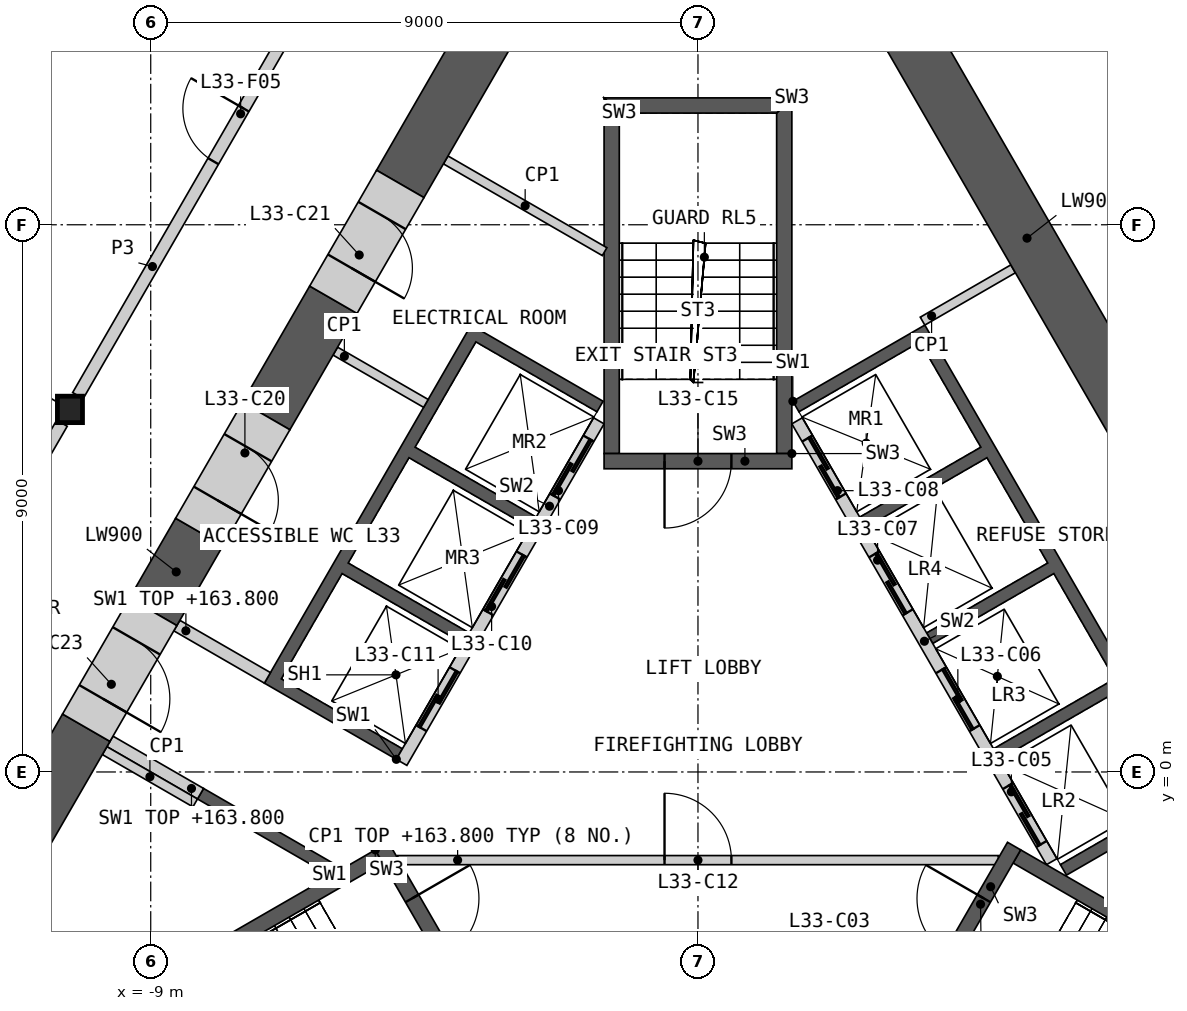
"""IFC4 building model, lengths in metres.
Left out: names, types, materials, properties, quantities, classifications, styles, units other than length and angle.
Written with IfcOpenShell. Run it as: python <this file> out.ifc"""

import sys

from ifc_helpers import new_model, si_unit, direction, frame, frame_2d, origin, origin_2d, place, context, subcontext, project, spatial, polyline, rectangle, i_section, outline, extrude, element, fill, save


model = new_model("IFC4")
c1 = context("Model", 3, precision=1e-05, world=origin(), true_north=direction((0.0, 1.0)))
c2 = subcontext(c1, "Body", "Model", "MODEL_VIEW")
j1 = project(units=[si_unit("LENGTHUNIT", "METRE"), si_unit("PLANEANGLEUNIT", "RADIAN")], contexts=[c1])
p1 = place(None, origin())
s1 = spatial("IfcSite", under=j1, at=p1, CompositionType="ELEMENT")
p2 = place(p1, origin())
s2 = spatial("IfcBuilding", under=s1, at=p2, CompositionType="ELEMENT")
p3 = place(p2, frame((0.0, 0.0, 154.2)))
s3 = spatial("IfcBuildingStorey", under=s2, at=p3, CompositionType="ELEMENT", Elevation=154.2)
p4 = place(p3, frame((-10.328, 5.963, 0.0), z_axis=(0.0, 0.0, 1.0), x_axis=(1.0, 0.0, 0.0)))
e1 = element("IfcColumn", 1, at=p4, inside=s3, PredefinedType="COLUMN", context=c2, shape_type="SweptSolid", body=[
    extrude(i_section(OverallWidth=0.412, OverallDepth=0.435, WebThickness=0.036, FlangeThickness=0.057, at=origin_2d()), origin(), (0.0, 0.0, 1.0), 10.0),
])
p5 = place(p3, origin())
e2 = element("IfcWall", 2, at=p5, inside=s3, PredefinedType="SHEAR", context=c2, shape_type="SweptSolid", body=[
    extrude(outline(polyline([(1.561, 6.097), (3.731, 7.35), (8.231, -0.444), (6.061, -1.697), (5.96, -1.524), (7.952, -0.374), (6.952, 1.358), (4.96, 0.208), (4.861, 0.381), (6.852, 1.531), (5.852, 3.263), (3.861, 2.113), (3.76, 2.287), (5.752, 3.437), (4.752, 5.169), (2.76, 4.019), (2.66, 4.192), (4.652, 5.342), (3.652, 7.074), (1.66, 5.924), (1.561, 6.097)])), origin(), (0.0, 0.0, 1.0), 9.6),
])
p6 = place(p3, frame((5.817, -1.476, 0.0), z_axis=(0.0, 0.0, 1.0), x_axis=(-0.500002616675, 0.866023893041, 0.0)))
e3 = element("IfcWall", 3, at=p6, inside=s3, PredefinedType="SOLIDWALL", context=c2, shape_type="SweptSolid", body=[
    extrude(rectangle(XDim=8.373, YDim=0.2, at=frame_2d((4.187, 0.0))), origin(), (0.0, 0.0, 1.0), 9.6),
])
p7 = place(p6, frame((0.337, 0.0, 0.0)))
e4 = element("IfcOpeningElement", 4, at=p7, cuts=e3, PredefinedType="OPENING", context=c2, shape_type="SweptSolid", body=[
    extrude(rectangle(XDim=1.1, YDim=2.1, at=frame_2d((0.55, 1.05))), frame((0.0, 0.11, 0.0), z_axis=(0.0, -1.0, 0.0), x_axis=(1.0, 0.0, 0.0)), (0.0, 0.0, 1.0), 0.22),
])
p8 = place(p6, frame((2.537, 0.0, 0.0)))
e5 = element("IfcOpeningElement", 5, at=p8, cuts=e3, PredefinedType="OPENING", context=c2, shape_type="SweptSolid", body=[
    extrude(rectangle(XDim=1.1, YDim=2.1, at=frame_2d((0.55, 1.05))), frame((0.0, 0.11, 0.0), z_axis=(0.0, -1.0, 0.0), x_axis=(1.0, 0.0, 0.0)), (0.0, 0.0, 1.0), 0.22),
])
p9 = place(p6, frame((4.737, 0.0, 0.0)))
e6 = element("IfcOpeningElement", 6, at=p9, cuts=e3, PredefinedType="OPENING", context=c2, shape_type="SweptSolid", body=[
    extrude(rectangle(XDim=1.1, YDim=2.1, at=frame_2d((0.55, 1.05))), frame((0.0, 0.11, 0.0), z_axis=(0.0, -1.0, 0.0), x_axis=(1.0, 0.0, 0.0)), (0.0, 0.0, 1.0), 0.22),
])
p10 = place(p6, frame((6.937, 0.0, 0.0)))
e7 = element("IfcOpeningElement", 7, at=p10, cuts=e3, PredefinedType="OPENING", context=c2, shape_type="SweptSolid", body=[
    extrude(rectangle(XDim=1.1, YDim=2.1, at=frame_2d((0.55, 1.05))), frame((0.0, 0.11, 0.0), z_axis=(0.0, -1.0, 0.0), x_axis=(1.0, 0.0, 0.0)), (0.0, 0.0, 1.0), 0.22),
])
p11 = place(p3, origin())
e8 = element("IfcWall", 8, at=p11, inside=s3, PredefinedType="SHEAR", context=c2, shape_type="SweptSolid", body=[
    extrude(outline(polyline([(-6.061, -1.697), (-8.231, -0.444), (-8.131, -0.271), (-5.96, -1.524), (-6.061, -1.697)])), origin(), (0.0, 0.0, 1.0), 9.6),
])
p12 = place(p3, origin())
e9 = element("IfcWall", 9, at=p12, inside=s3, PredefinedType="SHEAR", context=c2, shape_type="SweptSolid", body=[
    extrude(outline(polyline([(-4.96, 0.208), (-7.131, 1.461), (-3.731, 7.35), (-1.561, 6.097), (-1.66, 5.924), (-3.652, 7.074), (-4.652, 5.342), (-2.66, 4.192), (-2.76, 4.019), (-4.752, 5.169), (-5.752, 3.437), (-3.76, 2.287), (-3.861, 2.113), (-5.852, 3.263), (-6.852, 1.531), (-4.861, 0.381), (-4.96, 0.208)])), origin(), (0.0, 0.0, 1.0), 9.6),
])
p13 = place(p3, frame((-1.631, 5.776, 0.0), z_axis=(0.0, 0.0, 1.0), x_axis=(-0.499992876559, -0.866029516466, 0.0)))
e10 = element("IfcWall", 10, at=p13, inside=s3, PredefinedType="SOLIDWALL", context=c2, shape_type="SweptSolid", body=[
    extrude(rectangle(XDim=6.486, YDim=0.2, at=frame_2d((3.243, 0.0))), origin(), (0.0, 0.0, 1.0), 9.6),
])
p14 = place(p13, frame((0.337, 0.0, 0.0)))
e11 = element("IfcOpeningElement", 11, at=p14, cuts=e10, PredefinedType="OPENING", context=c2, shape_type="SweptSolid", body=[
    extrude(rectangle(XDim=1.1, YDim=2.1, at=frame_2d((0.55, 1.05))), frame((0.0, 0.11, 0.0), z_axis=(0.0, -1.0, 0.0), x_axis=(1.0, 0.0, 0.0)), (0.0, 0.0, 1.0), 0.22),
])
p15 = place(p13, frame((2.537, 0.0, 0.0)))
e12 = element("IfcOpeningElement", 12, at=p15, cuts=e10, PredefinedType="OPENING", context=c2, shape_type="SweptSolid", body=[
    extrude(rectangle(XDim=1.1, YDim=2.1, at=frame_2d((0.55, 1.05))), frame((0.0, 0.11, 0.0), z_axis=(0.0, -1.0, 0.0), x_axis=(1.0, 0.0, 0.0)), (0.0, 0.0, 1.0), 0.22),
])
p16 = place(p13, frame((4.737, 0.0, 0.0)))
e13 = element("IfcOpeningElement", 13, at=p16, cuts=e10, PredefinedType="OPENING", context=c2, shape_type="SweptSolid", body=[
    extrude(rectangle(XDim=1.1, YDim=2.1, at=frame_2d((0.55, 1.05))), frame((0.0, 0.11, 0.0), z_axis=(0.0, -1.0, 0.0), x_axis=(1.0, 0.0, 0.0)), (0.0, 0.0, 1.0), 0.22),
])
for number, where, z_axis, x_axis in (
    (14, (-7.081, 1.548, 0.0), (0.0, 0.0, 1.0), (-0.866, 0.5, 0.0)),
    (15, (-8.181, -0.357, 0.0), (0.0, 0.0, 1.0), (-0.866, 0.5, 0.0)),
):
    element("IfcWall", number, at=place(p3, frame(where, z_axis=z_axis, x_axis=x_axis)), inside=s3, PredefinedType="SHEAR", context=c2, shape_type="SweptSolid", body=[
        extrude(rectangle(XDim=1.72, YDim=0.2, at=frame_2d((0.86, 0.0))), origin(), (0.0, 0.0, 1.0), 9.6),
    ])
p17 = place(p3, frame((-4.941, -1.45, 0.0), z_axis=(0.0, 0.0, 1.0), x_axis=(1.0, 0.0, 0.0)))
e16 = element("IfcWall", 16, at=p17, inside=s3, PredefinedType="PARTITIONING", context=c2, shape_type="SweptSolid", body=[
    extrude(rectangle(XDim=9.882, YDim=0.15, at=frame_2d((4.941, 0.0))), origin(), (0.0, 0.0, 1.0), 9.6),
])
p18 = place(p17, frame((4.391, 0.0, 0.0)))
e17 = element("IfcOpeningElement", 17, at=p18, cuts=e16, PredefinedType="OPENING", context=c2, shape_type="SweptSolid", body=[
    extrude(rectangle(XDim=1.1, YDim=2.1, at=frame_2d((0.55, 1.05))), frame((0.0, 0.085, 0.0), z_axis=(0.0, -1.0, 0.0), x_axis=(1.0, 0.0, 0.0)), (0.0, 0.0, 1.0), 0.17),
])
p19 = place(p3, origin())
e18 = element("IfcWall", 18, at=p19, inside=s3, PredefinedType="SHEAR", context=c2, shape_type="SweptSolid", body=[
    extrude(outline(polyline([(-5.307, -1.281), (-10.374, -4.206), (-10.032, -4.298), (-5.182, -1.498), (-5.307, -1.281)])), origin(), (0.0, 0.0, 1.0), 9.6),
])
p20 = place(p3, frame((-5.199, -1.219, 0.0), z_axis=(0.0, 0.0, 1.0), x_axis=(0.499982516597, -0.866035497597, 0.0)))
e19 = element("IfcWall", 19, at=p20, inside=s3, PredefinedType="SHEAR", context=c2, shape_type="SweptSolid", body=[
    extrude(rectangle(XDim=3.088, YDim=0.25, at=frame_2d((1.544, 0.0))), origin(), (0.0, 0.0, 1.0), 9.6),
])
p21 = place(p20, frame((0.994, 0.0, 0.0)))
e20 = element("IfcOpeningElement", 20, at=p21, cuts=e19, PredefinedType="OPENING", context=c2, shape_type="SweptSolid", body=[
    extrude(rectangle(XDim=1.1, YDim=2.1, at=frame_2d((0.55, 1.05))), frame((0.0, 0.135, 0.0), z_axis=(0.0, -1.0, 0.0), x_axis=(1.0, 0.0, 0.0)), (0.0, 0.0, 1.0), 0.27),
])
p22 = place(p3, origin())
e21 = element("IfcWall", 21, at=p22, inside=s3, PredefinedType="SHEAR", context=c2, shape_type="SweptSolid", body=[
    extrude(outline(polyline([(10.032, -4.298), (10.374, -4.206), (5.307, -1.281), (5.182, -1.498), (10.032, -4.298)])), origin(), (0.0, 0.0, 1.0), 9.6),
])
p23 = place(p3, frame((3.655, -3.893, 0.0), z_axis=(0.0, 0.0, 1.0), x_axis=(0.499982516597, 0.866035497597, 0.0)))
e22 = element("IfcWall", 22, at=p23, inside=s3, PredefinedType="SHEAR", context=c2, shape_type="SweptSolid", body=[
    extrude(rectangle(XDim=3.088, YDim=0.25, at=frame_2d((1.544, 0.0))), origin(), (0.0, 0.0, 1.0), 9.6),
])
p24 = place(p23, frame((0.994, 0.0, 0.0)))
e23 = element("IfcOpeningElement", 23, at=p24, cuts=e22, PredefinedType="OPENING", context=c2, shape_type="SweptSolid", body=[
    extrude(rectangle(XDim=1.1, YDim=2.1, at=frame_2d((0.55, 1.05))), frame((0.0, 0.135, 0.0), z_axis=(0.0, -1.0, 0.0), x_axis=(1.0, 0.0, 0.0)), (0.0, 0.0, 1.0), 0.27),
])
p25 = place(p3, origin())
e24 = element("IfcWall", 24, at=p25, inside=s3, PredefinedType="SHEAR", context=c2, shape_type="SweptSolid", body=[
    extrude(outline(polyline([(1.544, 5.237), (1.544, 11.087), (1.294, 10.837), (1.294, 5.237), (1.544, 5.237)])), origin(), (0.0, 0.0, 1.0), 9.6),
])
p26 = place(p3, origin())
e25 = element("IfcWall", 25, at=p26, inside=s3, PredefinedType="SHEAR", context=c2, shape_type="SweptSolid", body=[
    extrude(outline(polyline([(1.544, 11.087), (-1.544, 11.087), (-1.294, 10.837), (1.294, 10.837), (1.544, 11.087)])), origin(), (0.0, 0.0, 1.0), 9.6),
])
p27 = place(p3, origin())
e26 = element("IfcWall", 26, at=p27, inside=s3, PredefinedType="SHEAR", context=c2, shape_type="SweptSolid", body=[
    extrude(outline(polyline([(-1.294, 10.837), (-1.544, 11.087), (-1.544, 5.237), (-1.294, 5.237), (-1.294, 10.837)])), origin(), (0.0, 0.0, 1.0), 9.6),
])
p28 = place(p3, frame((1.544, 5.112, 0.0), z_axis=(0.0, 0.0, 1.0), x_axis=(-1.0, 0.0, 0.0)))
e27 = element("IfcWall", 27, at=p28, inside=s3, PredefinedType="SHEAR", context=c2, shape_type="SweptSolid", body=[
    extrude(rectangle(XDim=3.088, YDim=0.25, at=frame_2d((1.544, 0.0))), origin(), (0.0, 0.0, 1.0), 9.6),
])
p29 = place(p28, frame((0.994, 0.0, 0.0)))
e28 = element("IfcOpeningElement", 28, at=p29, cuts=e27, PredefinedType="OPENING", context=c2, shape_type="SweptSolid", body=[
    extrude(rectangle(XDim=1.1, YDim=2.1, at=frame_2d((0.55, 1.05))), frame((0.0, 0.135, 0.0), z_axis=(0.0, -1.0, 0.0), x_axis=(1.0, 0.0, 0.0)), (0.0, 0.0, 1.0), 0.27),
])
for number, where, z_axis, x_axis in (
    (29, (3.693, 7.415, 0.0), (0.0, 0.0, 1.0), (0.866, 0.5, 0.0)),
    (30, (-8.268, -0.509, 0.0), (0.0, 0.0, 1.0), (-0.866, 0.5, 0.0)),
    (31, (-5.964, 6.922, 0.0), (0.0, 0.0, 1.0), (0.866, -0.5, 0.0)),
):
    element("IfcWall", number, at=place(p3, frame(where, z_axis=z_axis, x_axis=x_axis)), inside=s3, PredefinedType="PARTITIONING", context=c2, shape_type="SweptSolid", body=[
        extrude(rectangle(XDim=1.72, YDim=0.15, at=frame_2d((0.86, 0.0))), origin(), (0.0, 0.0, 1.0), 9.6),
    ])
p30 = place(p3, frame((-4.149, 10.067, 0.0), z_axis=(0.0, 0.0, 1.0), x_axis=(0.865988872794, -0.500063268193, 0.0)))
e32 = element("IfcWall", 32, at=p30, inside=s3, PredefinedType="PARTITIONING", context=c2, shape_type="SweptSolid", body=[
    extrude(rectangle(XDim=3.018, YDim=0.15, at=frame_2d((1.509, 0.0))), origin(), (0.0, 0.0, 1.0), 9.6),
])
p31 = place(p3, frame((7.31, 5.491, 0.0), z_axis=(0.0, 0.0, 1.0), x_axis=(-0.499996970966, 0.866027152591, 0.0)))
e33 = element("IfcWall", 33, at=p31, inside=s3, PredefinedType="SHEAR", context=c2, shape_type="SweptSolid", body=[
    extrude(rectangle(XDim=7.596, YDim=0.9, at=frame_2d((3.798, 0.0))), origin(), (0.0, 0.0, 1.0), 9.6),
])
p32 = place(p3, frame((-0.39, 17.478, 0.0), z_axis=(0.0, 0.0, 1.0), x_axis=(-0.499999130374, -0.866025905863, 0.0)))
e34 = element("IfcWall", 34, at=p32, inside=s3, PredefinedType="SHEAR", context=c2, shape_type="SweptSolid", body=[
    extrude(rectangle(XDim=9.013, YDim=0.9, at=frame_2d((4.507, 0.0))), origin(), (0.0, 0.0, 1.0), 9.6),
])
p33 = place(p3, frame((-10.06, 0.728, 0.0), z_axis=(0.0, 0.0, 1.0), x_axis=(-0.499996331799, -0.866027521611, 0.0)))
e35 = element("IfcWall", 35, at=p33, inside=s3, PredefinedType="SHEAR", context=c2, shape_type="SweptSolid", body=[
    extrude(rectangle(XDim=4.295, YDim=0.9, at=frame_2d((2.148, 0.0))), origin(), (0.0, 0.0, 1.0), 9.6),
])
p34 = place(p3, frame((-5.996, 7.767, 0.0), z_axis=(0.0, 0.0, 1.0), x_axis=(-0.499990325971, -0.866030989016, 0.0)))
e36 = element("IfcWall", 36, at=p34, inside=s3, PredefinedType="SHEAR", context=c2, shape_type="SweptSolid", body=[
    extrude(rectangle(XDim=2.209, YDim=0.9, at=frame_2d((1.104, 0.0))), origin(), (0.0, 0.0, 1.0), 9.6),
])
p35 = place(p3, frame((-8.201, 3.948, 0.0), z_axis=(0.0, 0.0, 1.0), x_axis=(-0.499977585228, -0.866038344573, 0.0)))
e37 = element("IfcWall", 37, at=p35, inside=s3, PredefinedType="SHEAR", context=c2, shape_type="SweptSolid", body=[
    extrude(rectangle(XDim=1.519, YDim=0.9, at=frame_2d((0.759, 0.0))), origin(), (0.0, 0.0, 1.0), 9.6),
])
p36 = place(p3, frame((-7.101, 5.854, 0.0), z_axis=(0.0, 0.0, 1.0), x_axis=(-0.499898558967, -0.866083962871, 0.0)))
e38 = element("IfcWall", 38, at=p36, inside=s3, PredefinedType="SHEAR", context=c2, shape_type="SweptSolid", body=[
    extrude(rectangle(XDim=2.2, YDim=0.9, at=frame_2d((1.1, 0.0))), origin(), (0.0, 0.0, 1.0), 9.6),
])
p37 = place(p36, frame((0.6, 0.0, 0.0)))
e39 = element("IfcOpeningElement", 39, at=p37, cuts=e38, PredefinedType="OPENING", context=c2, shape_type="SweptSolid", body=[
    extrude(rectangle(XDim=1.0, YDim=2.1, at=frame_2d((0.5, 1.05))), frame((0.0, 0.46, 0.0), z_axis=(0.0, -1.0, 0.0), x_axis=(1.0, 0.0, 0.0)), (0.0, 0.0, 1.0), 0.92),
])
p38 = place(p3, frame((-4.896, 9.672, 0.0), z_axis=(0.0, 0.0, 1.0), x_axis=(-0.50002983664, -0.866008176907, 0.0)))
e40 = element("IfcWall", 40, at=p38, inside=s3, PredefinedType="SHEAR", context=c2, shape_type="SweptSolid", body=[
    extrude(rectangle(XDim=2.2, YDim=0.9, at=frame_2d((1.1, 0.0))), origin(), (0.0, 0.0, 1.0), 9.6),
])
p39 = place(p38, frame((0.6, 0.0, 0.0)))
e41 = element("IfcOpeningElement", 41, at=p39, cuts=e40, PredefinedType="OPENING", context=c2, shape_type="SweptSolid", body=[
    extrude(rectangle(XDim=1.0, YDim=2.1, at=frame_2d((0.5, 1.05))), frame((0.0, 0.46, 0.0), z_axis=(0.0, -1.0, 0.0), x_axis=(1.0, 0.0, 0.0)), (0.0, 0.0, 1.0), 0.92),
])
p40 = place(p3, frame((-8.96, 2.633, 0.0), z_axis=(0.0, 0.0, 1.0), x_axis=(-0.50002983664, -0.866008176907, 0.0)))
e42 = element("IfcWall", 42, at=p40, inside=s3, PredefinedType="SHEAR", context=c2, shape_type="SweptSolid", body=[
    extrude(rectangle(XDim=2.2, YDim=0.9, at=frame_2d((1.1, 0.0))), origin(), (0.0, 0.0, 1.0), 9.6),
])
p41 = place(p40, frame((0.55, 0.0, 0.0)))
e43 = element("IfcOpeningElement", 43, at=p41, cuts=e42, PredefinedType="OPENING", context=c2, shape_type="SweptSolid", body=[
    extrude(rectangle(XDim=1.1, YDim=2.1, at=frame_2d((0.55, 1.05))), frame((0.0, 0.46, 0.0), z_axis=(0.0, -1.0, 0.0), x_axis=(1.0, 0.0, 0.0)), (0.0, 0.0, 1.0), 0.92),
])
p42 = place(p3, frame((-15.361, -2.754, 0.0), z_axis=(0.0, 0.0, 1.0), x_axis=(0.500004141693, 0.866023012564, 0.0)))
e44 = element("IfcWall", 44, at=p42, inside=s3, PredefinedType="PARTITIONING", context=c2, shape_type="SweptSolid", body=[
    extrude(rectangle(XDim=9.803, YDim=0.2, at=frame_2d((4.902, 0.0))), origin(), (0.0, 0.0, 1.0), 9.6),
])
p43 = place(p3, frame((-10.197, 6.19, 0.0), z_axis=(0.0, 0.0, 1.0), x_axis=(0.500012035596, 0.866018454918, 0.0)))
e45 = element("IfcWall", 45, at=p43, inside=s3, PredefinedType="PARTITIONING", context=c2, shape_type="SweptSolid", body=[
    extrude(rectangle(XDim=9.803, YDim=0.2, at=frame_2d((4.902, 0.0))), origin(), (0.0, 0.0, 1.0), 9.6),
])
p44 = place(p43, frame((4.452, 0.0, 0.0)))
e46 = element("IfcOpeningElement", 46, at=p44, cuts=e45, PredefinedType="OPENING", context=c2, shape_type="SweptSolid", body=[
    extrude(rectangle(XDim=1.0, YDim=2.1, at=frame_2d((0.5, 1.05))), frame((0.0, 0.11, 0.0), z_axis=(0.0, -1.0, 0.0), x_axis=(1.0, 0.0, 0.0)), (0.0, 0.0, 1.0), 0.22),
])
p45 = place(p3, frame((5.295, 14.68, 0.0), z_axis=(0.0, 0.0, 1.0), x_axis=(0.500012035596, -0.866018454918, 0.0)))
e47 = element("IfcWall", 47, at=p45, inside=s3, PredefinedType="PARTITIONING", context=c2, shape_type="SweptSolid", body=[
    extrude(rectangle(XDim=9.803, YDim=0.2, at=frame_2d((4.902, 0.0))), origin(), (0.0, 0.0, 1.0), 9.6),
])
p46 = place(p7, origin())
e48 = element("IfcDoor", 48, at=p46, inside=s3, OperationType="SLIDING_TO_LEFT", PredefinedType="DOOR", context=c2, shape_type="SweptSolid", body=[
    extrude(rectangle(XDim=1.1, YDim=2.1, at=frame_2d((0.55, 1.05))), frame((0.0, 0.025, 0.0), z_axis=(0.0, -1.0, 0.0), x_axis=(1.0, 0.0, 0.0)), (0.0, 0.0, 1.0), 0.05),
])
fill(e4, e48)
p47 = place(p8, origin())
e49 = element("IfcDoor", 49, at=p47, inside=s3, OperationType="SLIDING_TO_LEFT", PredefinedType="DOOR", context=c2, shape_type="SweptSolid", body=[
    extrude(rectangle(XDim=1.1, YDim=2.1, at=frame_2d((0.55, 1.05))), frame((0.0, 0.025, 0.0), z_axis=(0.0, -1.0, 0.0), x_axis=(1.0, 0.0, 0.0)), (0.0, 0.0, 1.0), 0.05),
])
fill(e5, e49)
p48 = place(p9, origin())
e50 = element("IfcDoor", 50, at=p48, inside=s3, OperationType="SLIDING_TO_LEFT", PredefinedType="DOOR", context=c2, shape_type="SweptSolid", body=[
    extrude(rectangle(XDim=1.1, YDim=2.1, at=frame_2d((0.55, 1.05))), frame((0.0, 0.025, 0.0), z_axis=(0.0, -1.0, 0.0), x_axis=(1.0, 0.0, 0.0)), (0.0, 0.0, 1.0), 0.05),
])
fill(e6, e50)
p49 = place(p10, origin())
e51 = element("IfcDoor", 51, at=p49, inside=s3, OperationType="SLIDING_TO_LEFT", PredefinedType="DOOR", context=c2, shape_type="SweptSolid", body=[
    extrude(rectangle(XDim=1.1, YDim=2.1, at=frame_2d((0.55, 1.05))), frame((0.0, 0.025, 0.0), z_axis=(0.0, -1.0, 0.0), x_axis=(1.0, 0.0, 0.0)), (0.0, 0.0, 1.0), 0.05),
])
fill(e7, e51)
p50 = place(p14, origin())
e52 = element("IfcDoor", 52, at=p50, inside=s3, OperationType="SLIDING_TO_LEFT", PredefinedType="DOOR", context=c2, shape_type="SweptSolid", body=[
    extrude(rectangle(XDim=1.1, YDim=2.1, at=frame_2d((0.55, 1.05))), frame((0.0, 0.025, 0.0), z_axis=(0.0, -1.0, 0.0), x_axis=(1.0, 0.0, 0.0)), (0.0, 0.0, 1.0), 0.05),
])
fill(e11, e52)
p51 = place(p15, origin())
e53 = element("IfcDoor", 53, at=p51, inside=s3, OperationType="SLIDING_TO_LEFT", PredefinedType="DOOR", context=c2, shape_type="SweptSolid", body=[
    extrude(rectangle(XDim=1.1, YDim=2.1, at=frame_2d((0.55, 1.05))), frame((0.0, 0.025, 0.0), z_axis=(0.0, -1.0, 0.0), x_axis=(1.0, 0.0, 0.0)), (0.0, 0.0, 1.0), 0.05),
])
fill(e12, e53)
p52 = place(p16, origin())
e54 = element("IfcDoor", 54, at=p52, inside=s3, OperationType="SLIDING_TO_LEFT", PredefinedType="DOOR", context=c2, shape_type="SweptSolid", body=[
    extrude(rectangle(XDim=1.1, YDim=2.1, at=frame_2d((0.55, 1.05))), frame((0.0, 0.025, 0.0), z_axis=(0.0, -1.0, 0.0), x_axis=(1.0, 0.0, 0.0)), (0.0, 0.0, 1.0), 0.05),
])
fill(e13, e54)
p53 = place(p18, origin())
e55 = element("IfcDoor", 55, at=p53, inside=s3, OperationType="SINGLE_SWING_LEFT", PredefinedType="DOOR", context=c2, shape_type="SweptSolid", body=[
    extrude(rectangle(XDim=1.1, YDim=2.1, at=frame_2d((0.55, 1.05))), frame((0.0, 0.025, 0.0), z_axis=(0.0, -1.0, 0.0), x_axis=(1.0, 0.0, 0.0)), (0.0, 0.0, 1.0), 0.05),
])
fill(e17, e55)
p54 = place(p21, origin())
e56 = element("IfcDoor", 56, at=p54, inside=s3, OperationType="SINGLE_SWING_LEFT", PredefinedType="DOOR", context=c2, shape_type="SweptSolid", body=[
    extrude(rectangle(XDim=1.1, YDim=2.1, at=frame_2d((0.55, 1.05))), frame((0.0, 0.025, 0.0), z_axis=(0.0, -1.0, 0.0), x_axis=(1.0, 0.0, 0.0)), (0.0, 0.0, 1.0), 0.05),
])
fill(e20, e56)
p55 = place(p24, origin())
e57 = element("IfcDoor", 57, at=p55, inside=s3, OperationType="SINGLE_SWING_RIGHT", PredefinedType="DOOR", context=c2, shape_type="SweptSolid", body=[
    extrude(rectangle(XDim=1.1, YDim=2.1, at=frame_2d((0.55, 1.05))), frame((0.0, 0.025, 0.0), z_axis=(0.0, -1.0, 0.0), x_axis=(1.0, 0.0, 0.0)), (0.0, 0.0, 1.0), 0.05),
])
fill(e23, e57)
p56 = place(p29, origin())
e58 = element("IfcDoor", 58, at=p56, inside=s3, OperationType="SINGLE_SWING_RIGHT", PredefinedType="DOOR", context=c2, shape_type="SweptSolid", body=[
    extrude(rectangle(XDim=1.1, YDim=2.1, at=frame_2d((0.55, 1.05))), frame((0.0, 0.025, 0.0), z_axis=(0.0, -1.0, 0.0), x_axis=(1.0, 0.0, 0.0)), (0.0, 0.0, 1.0), 0.05),
])
fill(e28, e58)
p57 = place(p37, origin())
e59 = element("IfcDoor", 59, at=p57, inside=s3, OperationType="SINGLE_SWING_RIGHT", PredefinedType="DOOR", context=c2, shape_type="SweptSolid", body=[
    extrude(rectangle(XDim=1.0, YDim=2.1, at=frame_2d((0.5, 1.05))), frame((0.0, 0.205, 0.0), z_axis=(0.0, -1.0, 0.0), x_axis=(1.0, 0.0, 0.0)), (0.0, 0.0, 1.0), 0.05),
])
fill(e39, e59)
p58 = place(p39, origin())
e60 = element("IfcDoor", 60, at=p58, inside=s3, OperationType="SINGLE_SWING_RIGHT", PredefinedType="DOOR", context=c2, shape_type="SweptSolid", body=[
    extrude(rectangle(XDim=1.0, YDim=2.1, at=frame_2d((0.5, 1.05))), frame((0.0, 0.205, 0.0), z_axis=(0.0, -1.0, 0.0), x_axis=(1.0, 0.0, 0.0)), (0.0, 0.0, 1.0), 0.05),
])
fill(e41, e60)
p59 = place(p41, origin())
e61 = element("IfcDoor", 61, at=p59, inside=s3, OperationType="SINGLE_SWING_RIGHT", PredefinedType="DOOR", context=c2, shape_type="SweptSolid", body=[
    extrude(rectangle(XDim=1.1, YDim=2.1, at=frame_2d((0.55, 1.05))), frame((0.0, 0.205, 0.0), z_axis=(0.0, -1.0, 0.0), x_axis=(1.0, 0.0, 0.0)), (0.0, 0.0, 1.0), 0.05),
])
fill(e43, e61)
p60 = place(p44, origin())
e62 = element("IfcDoor", 62, at=p60, inside=s3, OperationType="SINGLE_SWING_RIGHT", PredefinedType="DOOR", context=c2, shape_type="SweptSolid", body=[
    extrude(rectangle(XDim=1.0, YDim=2.1, at=frame_2d((0.5, 1.05))), frame((0.0, 0.025, 0.0), z_axis=(0.0, -1.0, 0.0), x_axis=(1.0, 0.0, 0.0)), (0.0, 0.0, 1.0), 0.05),
])
fill(e46, e62)
save(model, sys.argv[1])
